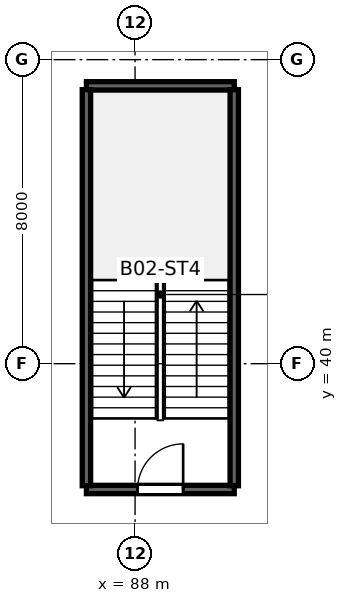
"""IFC4 building model, lengths in metres.
Left out: names, types, materials, properties, quantities, classifications, styles, units other than length and angle.
Written with IfcOpenShell. Run it as: python <this file> out.ifc"""

import sys

from ifc_helpers import new_model, si_unit, direction, frame, frame_2d, origin, place, context, subcontext, project, spatial, rectangle, extrude, source, transform, mapped, element, fill, save


model = new_model("IFC4")
c1 = context("Model", 3, precision=1e-05, world=origin(), true_north=direction((0.0, 1.0)))
c2 = subcontext(c1, "Body", "Model", "MODEL_VIEW")
j1 = project(units=[si_unit("LENGTHUNIT", "METRE"), si_unit("PLANEANGLEUNIT", "RADIAN")], contexts=[c1])
p1 = place(None, origin())
s1 = spatial("IfcSite", under=j1, at=p1, CompositionType="ELEMENT")
p2 = place(p1, origin())
s2 = spatial("IfcBuilding", under=s1, at=p2, CompositionType="ELEMENT")
p3 = place(p2, frame((0.0, 0.0, -10.0)))
s3 = spatial("IfcBuildingStorey", under=s2, at=p3, CompositionType="ELEMENT", Elevation=-10.0)
m1 = source(origin(), c2, "Body", "SweptSolid", [
    extrude(rectangle(XDim=3.89, YDim=0.22, at=frame_2d((1.945, 0.0))), origin(), (0.0, 0.0, 1.0), 5.0),
])
p4 = place(p3, frame((86.72, 36.69, 0.0), z_axis=(0.0, 0.0, 1.0), x_axis=(1.0, 0.0, 0.0)))
e1 = element("IfcWall", 1, at=p4, inside=s3, PredefinedType="SOLIDWALL", context=c2, shape_type="MappedRepresentation", body=[
    mapped(m1, transform((0.0, 0.0, 0.0), scale=1.0)),
])
p5 = place(p4, frame((1.345, 0.0, 0.0)))
e2 = element("IfcOpeningElement", 2, at=p5, cuts=e1, PredefinedType="OPENING", context=c2, shape_type="SweptSolid", body=[
    extrude(rectangle(XDim=1.2, YDim=2.15, at=frame_2d((0.6, 1.075))), frame((0.0, 0.12, 0.0), z_axis=(0.0, -1.0, 0.0), x_axis=(1.0, 0.0, 0.0)), (0.0, 0.0, 1.0), 0.24),
])
p6 = place(p3, frame((86.72, 47.31, 0.0), z_axis=(0.0, 0.0, 1.0), x_axis=(1.0, 0.0, 0.0)))
e3 = element("IfcWall", 3, at=p6, inside=s3, PredefinedType="SOLIDWALL", context=c2, shape_type="MappedRepresentation", body=[
    mapped(m1, transform((0.0, 0.0, 0.0), scale=1.0)),
])
m2 = source(origin(), c2, "Body", "SweptSolid", [
    extrude(rectangle(XDim=10.422, YDim=0.22, at=frame_2d((5.211, 0.0))), origin(), (0.0, 0.0, 1.0), 5.0),
])
for number, where, z_axis, x_axis in (
    (4, (86.72, 36.789, 0.0), (0.0, 0.0, 1.0), (0.0, 1.0, 0.0)),
    (5, (90.61, 36.789, 0.0), (0.0, 0.0, 1.0), (0.0, 1.0, 0.0)),
):
    element("IfcWall", number, at=place(p3, frame(where, z_axis=z_axis, x_axis=x_axis)), inside=s3, PredefinedType="SOLIDWALL", context=c2, shape_type="MappedRepresentation", body=[
        mapped(m2, transform((0.0, 0.0, 0.0), scale=1.0)),
    ])
m3 = source(origin(), c2, "Body", "SweptSolid", [
    extrude(rectangle(XDim=1.2, YDim=2.15, at=frame_2d((0.6, 1.075))), frame((0.0, 0.025, 0.0), z_axis=(0.0, -1.0, 0.0), x_axis=(1.0, 0.0, 0.0)), (0.0, 0.0, 1.0), 0.05),
])
p7 = place(p5, origin())
e6 = element("IfcDoor", 6, at=p7, inside=s3, OperationType="SINGLE_SWING_RIGHT", PredefinedType="DOOR", context=c2, shape_type="MappedRepresentation", body=[
    mapped(m3, transform((0.0, 0.0, 0.0), scale=1.0)),
])
fill(e2, e6)
save(model, sys.argv[1])
